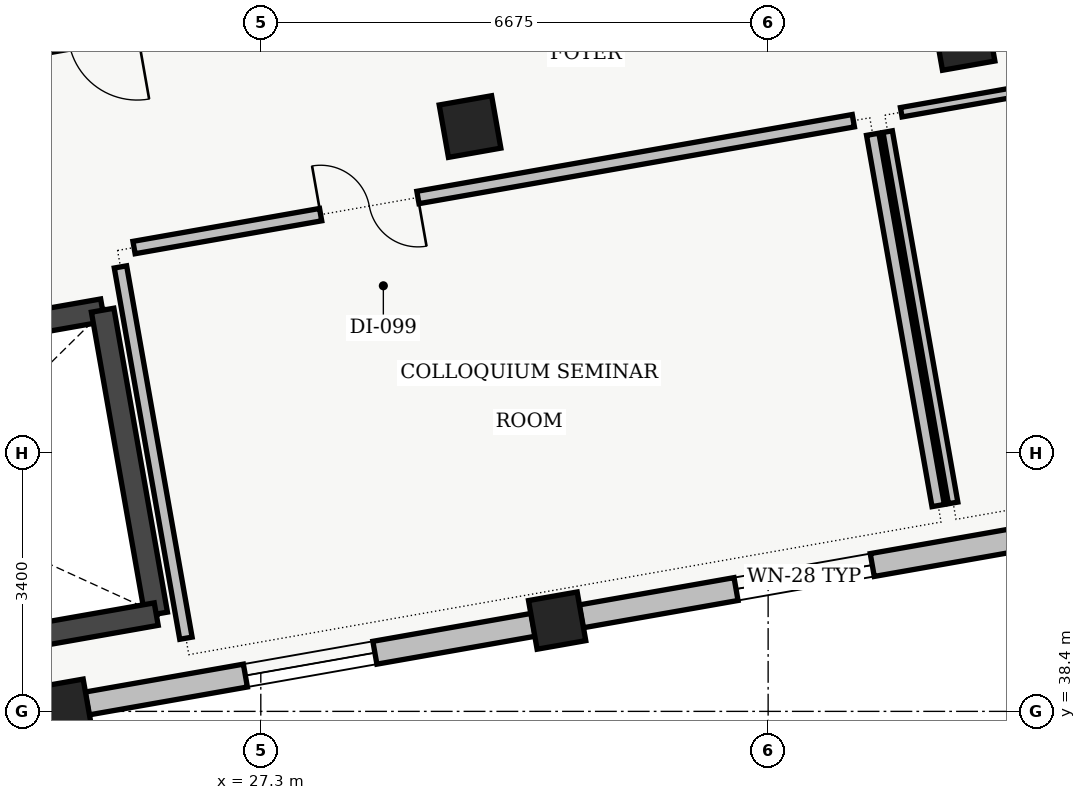
"""IFC4 building model, lengths in metres.
Left out: names, types, materials, properties, quantities, classifications, styles, units other than length and angle.
Written with IfcOpenShell. Run it as: python <this file> out.ifc"""

import sys

from ifc_helpers import new_model, si_unit, direction, frame, frame_2d, origin, origin_2d, place, context, subcontext, project, spatial, rectangle, extrude, element, fill, save


model = new_model("IFC4")
c1 = context("Model", 3, precision=1e-05, world=origin(), true_north=direction((0.0, 1.0)))
c2 = subcontext(c1, "Body", "Model", "MODEL_VIEW")
j1 = project(units=[si_unit("LENGTHUNIT", "METRE"), si_unit("PLANEANGLEUNIT", "RADIAN")], contexts=[c1])
p1 = place(None, origin())
s1 = spatial("IfcSite", under=j1, at=p1, CompositionType="ELEMENT")
p2 = place(p1, origin())
s2 = spatial("IfcBuilding", under=s1, at=p2, CompositionType="ELEMENT")
p3 = place(p2, frame((0.0, 0.0, 14.1)))
s3 = spatial("IfcBuildingStorey", under=s2, at=p3, CompositionType="ELEMENT", Elevation=14.1)
for number, where, z_axis, x_axis in (
    (1, (24.699, 38.448, 0.0), (0.0, 0.0, 1.0), (0.985, 0.174, 0.0)),
    (2, (31.199, 39.594, 0.0), (0.0, 0.0, 1.0), (0.985, 0.174, 0.0)),
):
    element("IfcColumn", number, at=place(p3, frame(where, z_axis=z_axis, x_axis=x_axis)), inside=s3, PredefinedType="COLUMN", context=c2, shape_type="SweptSolid", body=[
        extrude(rectangle(XDim=0.65, YDim=0.65, at=origin_2d()), origin(), (0.0, 0.0, 1.0), 4.31),
    ])
for number, where, z_axis, x_axis in (
    (3, (30.053, 46.094, 0.0), (0.0, 0.0, 1.0), (0.985, 0.174, 0.0)),
    (4, (36.552, 47.24, 0.0), (0.0, 0.0, 1.0), (0.985, 0.174, 0.0)),
):
    element("IfcColumn", number, at=place(p3, frame(where, z_axis=z_axis, x_axis=x_axis)), inside=s3, PredefinedType="COLUMN", context=c2, shape_type="SweptSolid", body=[
        extrude(rectangle(XDim=0.7, YDim=0.7, at=origin_2d()), origin(), (0.0, 0.0, 1.0), 4.31),
    ])
p4 = place(p3, frame((37.384, 40.685, 0.0), z_axis=(0.0, 0.0, 1.0), x_axis=(-0.98480829201, -0.173645120828, 0.0)))
e5 = element("IfcWall", 5, at=p4, inside=s3, PredefinedType="STANDARD", context=c2, shape_type="SweptSolid", body=[
    extrude(rectangle(XDim=5.96, YDim=0.305, at=frame_2d((2.98, 0.0))), origin(), (0.0, 0.0, 1.0), 3.795),
])
p5 = place(p4, frame((2.07, 0.0, 0.95)))
e6 = element("IfcOpeningElement", 6, at=p5, cuts=e5, PredefinedType="OPENING", context=c2, shape_type="SweptSolid", body=[
    extrude(rectangle(XDim=1.82, YDim=1.38, at=frame_2d((0.91, 0.69))), frame((0.0, 0.152, 0.0), z_axis=(0.0, -1.0, 0.0), x_axis=(1.0, 0.0, 0.0)), (0.0, 0.0, 1.0), 0.305),
])
p6 = place(p3, frame((30.884, 39.539, 0.0), z_axis=(0.0, 0.0, 1.0), x_axis=(-0.98480829201, -0.173645120828, 0.0)))
e7 = element("IfcWall", 7, at=p6, inside=s3, PredefinedType="STANDARD", context=c2, shape_type="SweptSolid", body=[
    extrude(rectangle(XDim=5.96, YDim=0.305, at=frame_2d((2.98, 0.0))), origin(), (0.0, 0.0, 1.0), 3.795),
])
p7 = place(p6, frame((2.115, 0.0, 0.95)))
e8 = element("IfcOpeningElement", 8, at=p7, cuts=e7, PredefinedType="OPENING", context=c2, shape_type="SweptSolid", body=[
    extrude(rectangle(XDim=1.73, YDim=1.36, at=frame_2d((0.865, 0.68))), frame((0.0, 0.152, 0.0), z_axis=(0.0, -1.0, 0.0), x_axis=(1.0, 0.0, 0.0)), (0.0, 0.0, 1.0), 0.305),
])
p8 = place(p3, frame((17.863, 42.381, 0.0), z_axis=(0.0, 0.0, 1.0), x_axis=(0.984808225754, 0.173645496596, 0.0)))
e9 = element("IfcWall", 9, at=p8, inside=s3, PredefinedType="SHEAR", context=c2, shape_type="SweptSolid", body=[
    extrude(rectangle(XDim=7.47, YDim=0.3, at=frame_2d((3.735, 0.0))), origin(), (0.0, 0.0, 1.0), 4.28),
])
p9 = place(p8, frame((0.18, 0.0, 0.0)))
e10 = element("IfcOpeningElement", 10, at=p9, cuts=e9, PredefinedType="OPENING", context=c2, shape_type="SweptSolid", body=[
    extrude(rectangle(XDim=1.24, YDim=2.15, at=frame_2d((0.62, 1.075))), frame((0.0, 0.15, 0.0), z_axis=(0.0, -1.0, 0.0), x_axis=(1.0, 0.0, 0.0)), (0.0, 0.0, 1.0), 0.3),
])
p10 = place(p3, frame((25.219, 43.678, 0.0), z_axis=(0.0, 0.0, 1.0), x_axis=(0.173665267602, -0.984804739443, 0.0)))
e11 = element("IfcWall", 11, at=p10, inside=s3, PredefinedType="SHEAR", context=c2, shape_type="SweptSolid", body=[
    extrude(rectangle(XDim=4.06, YDim=0.3, at=frame_2d((2.03, 0.0))), origin(), (0.0, 0.0, 1.0), 4.28),
])
p11 = place(p3, frame((25.924, 39.68, 0.0), z_axis=(0.0, 0.0, 1.0), x_axis=(-0.984809211193, -0.173639907711, 0.0)))
e12 = element("IfcWall", 12, at=p11, inside=s3, PredefinedType="SHEAR", context=c2, shape_type="SweptSolid", body=[
    extrude(rectangle(XDim=7.47, YDim=0.3, at=frame_2d((3.735, 0.0))), origin(), (0.0, 0.0, 1.0), 4.28),
])
p12 = place(p3, frame((20.665, 46.469, 0.0), z_axis=(0.0, 0.0, 1.0), x_axis=(0.984804784872, 0.173665009985, 0.0)))
e13 = element("IfcWall", 13, at=p12, inside=s3, PredefinedType="PARTITIONING", context=c2, shape_type="SweptSolid", body=[
    extrude(rectangle(XDim=9.26, YDim=0.165, at=frame_2d((4.63, 0.0))), origin(), (0.0, 0.0, 1.0), 3.895),
])
p13 = place(p12, frame((4.175, 0.0, 0.0)))
e14 = element("IfcOpeningElement", 14, at=p13, cuts=e13, PredefinedType="OPENING", context=c2, shape_type="SweptSolid", body=[
    extrude(rectangle(XDim=0.91, YDim=2.08, at=frame_2d((0.455, 1.04))), frame((0.0, 0.083, 0.0), z_axis=(0.0, -1.0, 0.0), x_axis=(1.0, 0.0, 0.0)), (0.0, 0.0, 1.0), 0.165),
])
p14 = place(p3, frame((36.212, 41.108, 0.0), z_axis=(0.0, 0.0, 1.0), x_axis=(-0.173611232021, 0.984814266812, 0.0)))
e15 = element("IfcWall", 15, at=p14, inside=s3, PredefinedType="PARTITIONING", context=c2, shape_type="SweptSolid", body=[
    extrude(rectangle(XDim=4.96, YDim=0.165, at=frame_2d((2.48, 0.0))), origin(), (0.0, 0.0, 1.0), 3.95),
])
p15 = place(p3, frame((35.096, 46.171, 0.0), z_axis=(0.0, 0.0, 1.0), x_axis=(-0.98480912325, -0.173640406486, 0.0)))
e16 = element("IfcWall", 16, at=p15, inside=s3, PredefinedType="PARTITIONING", context=c2, shape_type="SweptSolid", body=[
    extrude(rectangle(XDim=9.61, YDim=0.165, at=frame_2d((4.805, 0.0))), origin(), (0.0, 0.0, 1.0), 3.95),
])
p16 = place(p15, frame((5.817, 0.0, 0.0)))
e17 = element("IfcOpeningElement", 17, at=p16, cuts=e16, PredefinedType="OPENING", context=c2, shape_type="SweptSolid", body=[
    extrude(rectangle(XDim=1.3, YDim=2.18, at=frame_2d((0.65, 1.09))), frame((0.0, 0.083, 0.0), z_axis=(0.0, -1.0, 0.0), x_axis=(1.0, 0.0, 0.0)), (0.0, 0.0, 1.0), 0.165),
])
p17 = place(p3, frame((25.454, 44.247, 0.0), z_axis=(0.0, 0.0, 1.0), x_axis=(0.173658971256, -0.98480584975, 0.0)))
e18 = element("IfcWall", 18, at=p17, inside=s3, PredefinedType="PARTITIONING", context=c2, shape_type="SweptSolid", body=[
    extrude(rectangle(XDim=4.96, YDim=0.165, at=frame_2d((2.48, 0.0))), origin(), (0.0, 0.0, 1.0), 3.95),
])
p18 = place(p3, frame((42.581, 47.491, 0.0), z_axis=(0.0, 0.0, 1.0), x_axis=(-0.984804033539, -0.173669270527, 0.0)))
e19 = element("IfcWall", 19, at=p18, inside=s3, PredefinedType="PARTITIONING", context=c2, shape_type="SweptSolid", body=[
    extrude(rectangle(XDim=6.96, YDim=0.125, at=frame_2d((3.48, 0.0))), origin(), (0.0, 0.0, 1.0), 3.95),
])
p19 = place(p18, frame((3.01, 0.0, 0.0)))
e20 = element("IfcOpeningElement", 20, at=p19, cuts=e19, PredefinedType="OPENING", context=c2, shape_type="SweptSolid", body=[
    extrude(rectangle(XDim=0.94, YDim=2.12, at=frame_2d((0.47, 1.06))), frame((0.0, 0.062, 0.0), z_axis=(0.0, -1.0, 0.0), x_axis=(1.0, 0.0, 0.0)), (0.0, 0.0, 1.0), 0.125),
])
p20 = place(p3, frame((35.548, 46.027, 0.0), z_axis=(0.0, 0.0, 1.0), x_axis=(0.173650553511, -0.984807334084, 0.0)))
e21 = element("IfcWall", 21, at=p20, inside=s3, PredefinedType="PARTITIONING", context=c2, shape_type="SweptSolid", body=[
    extrude(rectangle(XDim=4.96, YDim=0.125, at=frame_2d((2.48, 0.0))), origin(), (0.0, 0.0, 1.0), 3.95),
])
p21 = place(p5, origin())
e22 = element("IfcWindow", 22, at=p21, inside=s3, PartitioningType="SINGLE_PANEL", PredefinedType="WINDOW", context=c2, shape_type="SweptSolid", body=[
    extrude(rectangle(XDim=1.82, YDim=1.38, at=frame_2d((0.91, 0.69))), frame((0.0, 0.03, 0.0), z_axis=(0.0, -1.0, 0.0), x_axis=(1.0, 0.0, 0.0)), (0.0, 0.0, 1.0), 0.06),
])
fill(e6, e22)
p22 = place(p7, origin())
e23 = element("IfcWindow", 23, at=p22, inside=s3, PartitioningType="SINGLE_PANEL", PredefinedType="WINDOW", context=c2, shape_type="SweptSolid", body=[
    extrude(rectangle(XDim=1.73, YDim=1.36, at=frame_2d((0.865, 0.68))), frame((0.0, 0.03, 0.0), z_axis=(0.0, -1.0, 0.0), x_axis=(1.0, 0.0, 0.0)), (0.0, 0.0, 1.0), 0.06),
])
fill(e8, e23)
p23 = place(p16, origin())
e24 = element("IfcDoor", 24, at=p23, inside=s3, OperationType="DOUBLE_DOOR_SINGLE_SWING", PredefinedType="DOOR", context=c2, shape_type="SweptSolid", body=[
    extrude(rectangle(XDim=1.3, YDim=2.18, at=frame_2d((0.65, 1.09))), frame((0.0, 0.025, 0.0), z_axis=(0.0, -1.0, 0.0), x_axis=(1.0, 0.0, 0.0)), (0.0, 0.0, 1.0), 0.05),
])
fill(e17, e24)
save(model, sys.argv[1])
